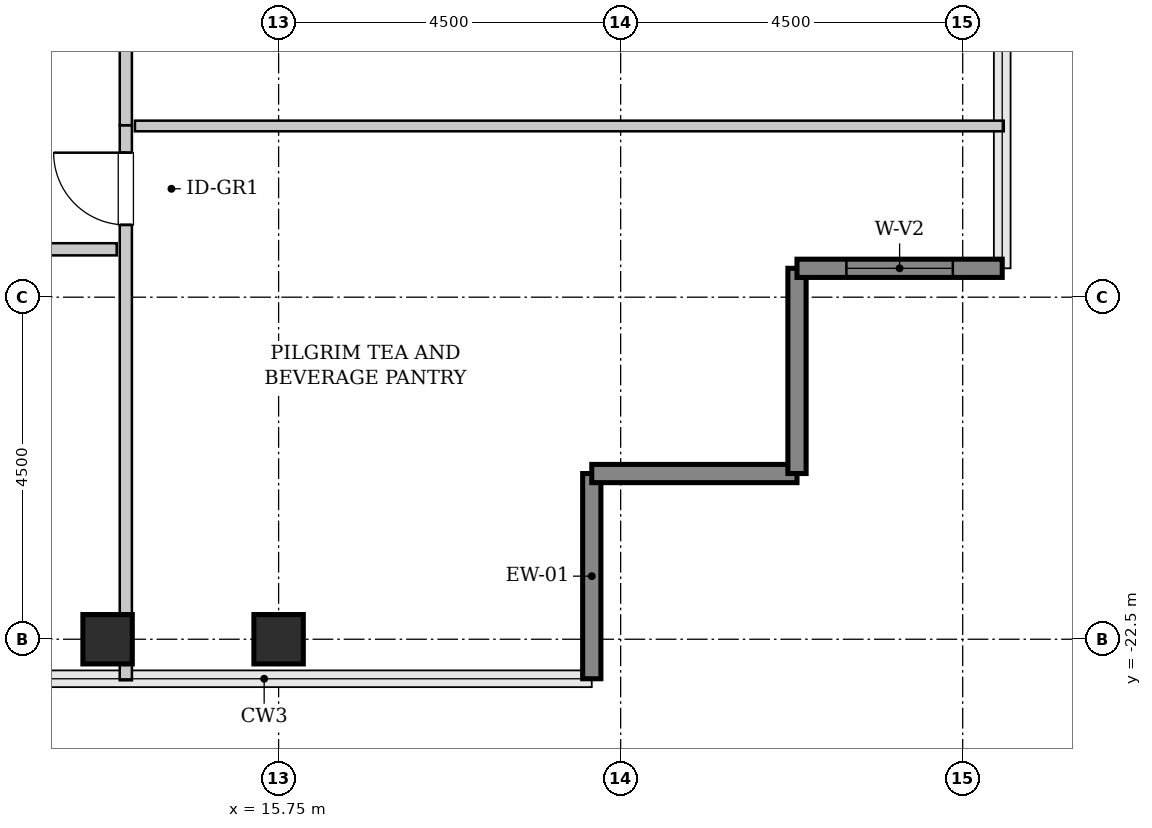
"""IFC4 building model, lengths in metres.
Left out: names, types, materials, properties, quantities, classifications, styles, units other than length and angle.
Written with IfcOpenShell. Run it as: python <this file> out.ifc"""

import sys

from ifc_helpers import new_model, si_unit, direction, frame, frame_2d, origin, origin_2d, place, context, subcontext, project, spatial, rectangle, hollow_rectangle, extrude, source, transform, mapped, element, fill, save


model = new_model("IFC4")
c1 = context("Model", 3, precision=1e-05, world=origin(), true_north=direction((0.0, 1.0)))
c2 = subcontext(c1, "Body", "Model", "MODEL_VIEW")
j1 = project(units=[si_unit("LENGTHUNIT", "METRE"), si_unit("PLANEANGLEUNIT", "RADIAN")], contexts=[c1])
p1 = place(None, origin())
s1 = spatial("IfcSite", under=j1, at=p1, CompositionType="ELEMENT")
p2 = place(p1, origin())
s2 = spatial("IfcBuilding", under=s1, at=p2, CompositionType="ELEMENT")
p3 = place(p2, frame((0.0, 0.0, 256.0)))
s3 = spatial("IfcBuildingStorey", under=s2, at=p3, CompositionType="ELEMENT", Elevation=256.0)
m1 = source(origin(), c2, "Body", "SweptSolid", [
    extrude(hollow_rectangle(XDim=0.65, YDim=0.65, WallThickness=0.032, InnerFilletRadius=0.032, OuterFilletRadius=0.064, at=origin_2d()), origin(), (0.0, 0.0, 1.0), 3.8),
])
for number, where, z_axis, x_axis in (
    (1, (13.5, -22.5, 0.0), (0.0, 0.0, 1.0), (1.0, 0.0, 0.0)),
    (2, (15.75, -22.5, 0.0), (0.0, 0.0, 1.0), (1.0, 0.0, 0.0)),
):
    element("IfcColumn", number, at=place(p3, frame(where, z_axis=z_axis, x_axis=x_axis)), inside=s3, PredefinedType="COLUMN", context=c2, shape_type="MappedRepresentation", body=[
        mapped(m1, transform((0.0, 0.0, 0.0), x_axis=(1.0, 0.0, 0.0), y_axis=(0.0, 1.0, 0.0), z_axis=(0.0, 0.0, 1.0), scale=1.0)),
    ])
m2 = source(origin(), c2, "Body", "SweptSolid", [
    extrude(rectangle(XDim=2.7, YDim=0.24, at=frame_2d((1.35, 0.0))), origin(), (0.0, 0.0, 1.0), 3.5),
])
for number, where, z_axis, x_axis in (
    (3, (19.87, -23.02, 0.0), (0.0, 0.0, 1.0), (0.0, 1.0, 0.0)),
    (4, (19.87, -20.32, 0.0), (0.0, 0.0, 1.0), (1.0, 0.0, 0.0)),
    (5, (22.57, -20.32, 0.0), (0.0, 0.0, 1.0), (0.0, 1.0, 0.0)),
):
    element("IfcWall", number, at=place(p3, frame(where, z_axis=z_axis, x_axis=x_axis)), inside=s3, PredefinedType="SHEAR", context=c2, shape_type="MappedRepresentation", body=[
        mapped(m2, transform((0.0, 0.0, 0.0), x_axis=(1.0, 0.0, 0.0), y_axis=(0.0, 1.0, 0.0), z_axis=(0.0, 0.0, 1.0), scale=1.0)),
    ])
p4 = place(p3, frame((22.57, -17.62, 0.0), z_axis=(0.0, 0.0, 1.0), x_axis=(1.0, 0.0, 0.0)))
e6 = element("IfcWall", 6, at=p4, inside=s3, PredefinedType="SHEAR", context=c2, shape_type="MappedRepresentation", body=[
    mapped(m2, transform((0.0, 0.0, 0.0), x_axis=(1.0, 0.0, 0.0), y_axis=(0.0, 1.0, 0.0), z_axis=(0.0, 0.0, 1.0), scale=1.0)),
])
p5 = place(p4, frame((0.65, 0.0, 0.85)))
e7 = element("IfcOpeningElement", 7, at=p5, cuts=e6, PredefinedType="OPENING", context=c2, shape_type="SweptSolid", body=[
    extrude(rectangle(XDim=1.4, YDim=1.8, at=frame_2d((0.7, 0.9))), frame((0.0, 0.13, 0.0), z_axis=(0.0, -1.0, 0.0), x_axis=(1.0, 0.0, 0.0)), (0.0, 0.0, 1.0), 0.26),
])
m3 = source(origin(), c2, "Body", "SweptSolid", [
    extrude(rectangle(XDim=7.302, YDim=0.16, at=frame_2d((3.651, 0.0))), origin(), (0.0, 0.0, 1.0), 3.485),
])
p6 = place(p3, frame((13.74, -23.04, 0.0), z_axis=(0.0, 0.0, 1.0), x_axis=(0.0, 1.0, 0.0)))
e8 = element("IfcWall", 8, at=p6, inside=s3, PredefinedType="PARTITIONING", context=c2, shape_type="MappedRepresentation", body=[
    mapped(m3, transform((0.0, 0.0, 0.0), x_axis=(1.0, 0.0, 0.0), y_axis=(0.0, 1.0, 0.0), z_axis=(0.0, 0.0, 1.0), scale=1.0)),
])
p7 = place(p6, frame((5.991, 0.0, 0.0)))
e9 = element("IfcOpeningElement", 9, at=p7, cuts=e8, PredefinedType="OPENING", context=c2, shape_type="SweptSolid", body=[
    extrude(rectangle(XDim=0.95, YDim=2.1, at=frame_2d((0.475, 1.05))), frame((0.0, 0.09, 0.0), z_axis=(0.0, -1.0, 0.0), x_axis=(1.0, 0.0, 0.0)), (0.0, 0.0, 1.0), 0.18),
])
m4 = source(origin(), c2, "Body", "SweptSolid", [
    extrude(rectangle(XDim=11.43, YDim=0.14, at=frame_2d((5.715, 0.0))), origin(), (0.0, 0.0, 1.0), 3.485),
])
p8 = place(p3, frame((13.86, -15.748, 0.0), z_axis=(0.0, 0.0, 1.0), x_axis=(1.0, 0.0, 0.0)))
e10 = element("IfcWall", 10, at=p8, inside=s3, PredefinedType="PARTITIONING", context=c2, shape_type="MappedRepresentation", body=[
    mapped(m4, transform((0.0, 0.0, 0.0), x_axis=(1.0, 0.0, 0.0), y_axis=(0.0, 1.0, 0.0), z_axis=(0.0, 0.0, 1.0), scale=1.0)),
])
m5 = source(origin(), c2, "Body", "SweptSolid", [
    extrude(rectangle(XDim=7.242, YDim=0.16, at=frame_2d((3.621, 0.0))), origin(), (0.0, 0.0, 1.0), 3.485),
])
p9 = place(p3, frame((13.74, -15.738, 0.0), z_axis=(0.0, 0.0, 1.0), x_axis=(0.0, 1.0, 0.0)))
e11 = element("IfcWall", 11, at=p9, inside=s3, PredefinedType="PARTITIONING", context=c2, shape_type="MappedRepresentation", body=[
    mapped(m5, transform((0.0, 0.0, 0.0), x_axis=(1.0, 0.0, 0.0), y_axis=(0.0, 1.0, 0.0), z_axis=(0.0, 0.0, 1.0), scale=1.0)),
])
p10 = place(p9, frame((3.146, 0.0, 0.0)))
e12 = element("IfcOpeningElement", 12, at=p10, cuts=e11, PredefinedType="OPENING", context=c2, shape_type="SweptSolid", body=[
    extrude(rectangle(XDim=0.95, YDim=2.1, at=frame_2d((0.475, 1.05))), frame((0.0, 0.09, 0.0), z_axis=(0.0, -1.0, 0.0), x_axis=(1.0, 0.0, 0.0)), (0.0, 0.0, 1.0), 0.18),
])
m6 = source(origin(), c2, "Body", "SweptSolid", [
    extrude(rectangle(XDim=6.825, YDim=0.16, at=frame_2d((3.413, 0.0))), origin(), (0.0, 0.0, 1.0), 3.485),
])
p11 = place(p3, frame((6.795, -17.37, 0.0), z_axis=(0.0, 0.0, 1.0), x_axis=(1.0, 0.0, 0.0)))
e13 = element("IfcWall", 13, at=p11, inside=s3, PredefinedType="PARTITIONING", context=c2, shape_type="MappedRepresentation", body=[
    mapped(m6, transform((0.0, 0.0, 0.0), x_axis=(1.0, 0.0, 0.0), y_axis=(0.0, 1.0, 0.0), z_axis=(0.0, 0.0, 1.0), scale=1.0)),
])
p12 = place(p11, frame((2.938, 0.0, 0.0)))
e14 = element("IfcOpeningElement", 14, at=p12, cuts=e13, PredefinedType="OPENING", context=c2, shape_type="SweptSolid", body=[
    extrude(rectangle(XDim=0.95, YDim=2.1, at=frame_2d((0.475, 1.05))), frame((0.0, 0.09, 0.0), z_axis=(0.0, -1.0, 0.0), x_axis=(1.0, 0.0, 0.0)), (0.0, 0.0, 1.0), 0.18),
])
m7 = source(origin(), c2, "Body", "SweptSolid", [
    extrude(rectangle(XDim=1.4, YDim=1.8, at=frame_2d((0.7, 0.9))), frame((0.0, 0.03, 0.0), z_axis=(0.0, -1.0, 0.0), x_axis=(1.0, 0.0, 0.0)), (0.0, 0.0, 1.0), 0.06),
])
p13 = place(p5, origin())
e15 = element("IfcWindow", 15, at=p13, inside=s3, PartitioningType="SINGLE_PANEL", PredefinedType="WINDOW", context=c2, shape_type="MappedRepresentation", body=[
    mapped(m7, transform((0.0, 0.0, 0.0), x_axis=(1.0, 0.0, 0.0), y_axis=(0.0, 1.0, 0.0), z_axis=(0.0, 0.0, 1.0), scale=1.0)),
])
fill(e7, e15)
m8 = source(origin(), c2, "Body", "SweptSolid", [
    extrude(rectangle(XDim=0.95, YDim=2.1, at=frame_2d((0.475, 1.05))), frame((0.0, 0.025, 0.0), z_axis=(0.0, -1.0, 0.0), x_axis=(1.0, 0.0, 0.0)), (0.0, 0.0, 1.0), 0.05),
])
p14 = place(p7, origin())
e16 = element("IfcDoor", 16, at=p14, inside=s3, OperationType="SINGLE_SWING_RIGHT", PredefinedType="DOOR", context=c2, shape_type="MappedRepresentation", body=[
    mapped(m8, transform((0.0, 0.0, 0.0), x_axis=(1.0, 0.0, 0.0), y_axis=(0.0, 1.0, 0.0), z_axis=(0.0, 0.0, 1.0), scale=1.0)),
])
fill(e9, e16)
save(model, sys.argv[1])
